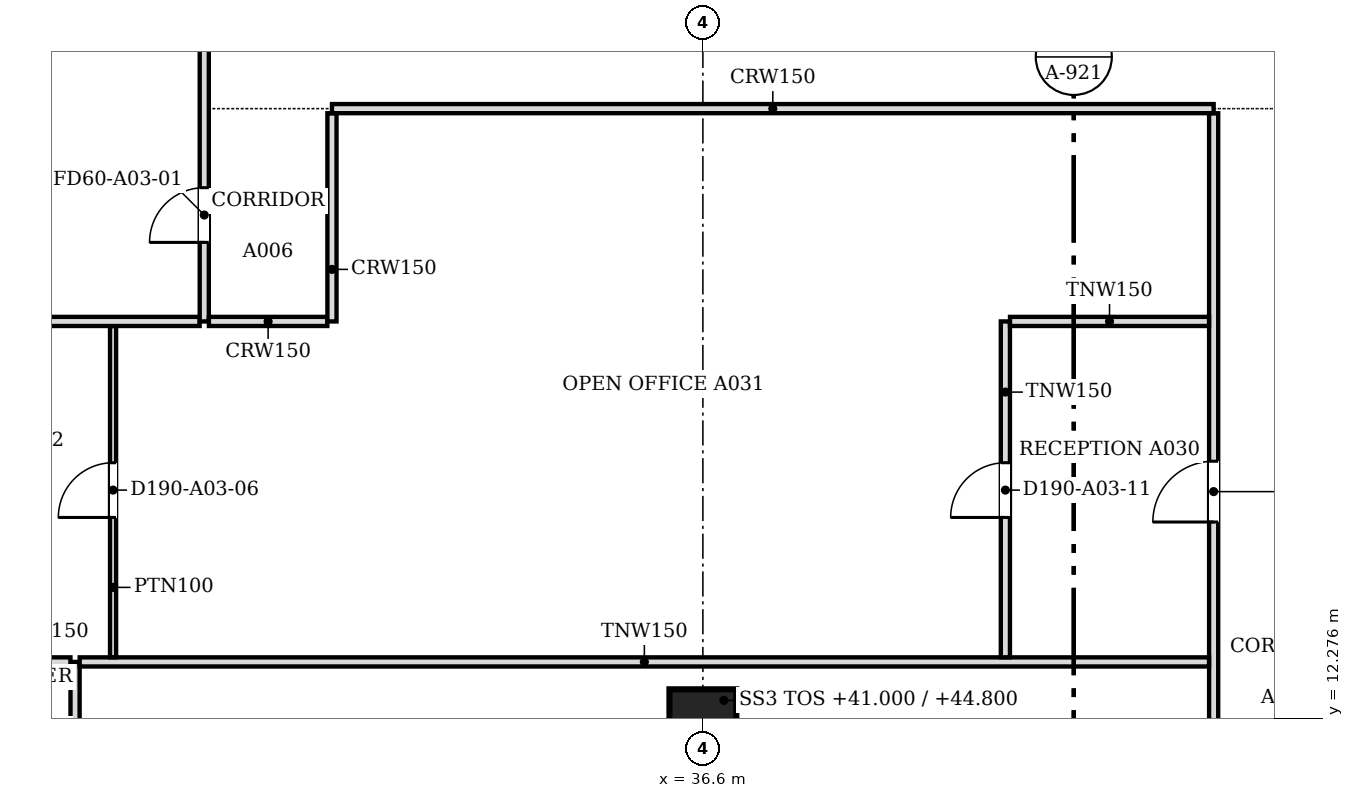
"""IFC4 building model, lengths in metres.
Left out: names, types, materials, properties, quantities, classifications, styles, units other than length and angle.
Written with IfcOpenShell. Run it as: python <this file> out.ifc"""

import sys

from ifc_helpers import new_model, si_unit, direction, frame, frame_2d, origin, origin_2d, place, context, subcontext, project, spatial, rectangle, extrude, source, transform, mapped, element, fill, save


model = new_model("IFC4")
c1 = context("Model", 3, precision=1e-05, world=origin(), true_north=direction((0.0, 1.0)))
c2 = subcontext(c1, "Body", "Model", "MODEL_VIEW")
j1 = project(units=[si_unit("LENGTHUNIT", "METRE"), si_unit("PLANEANGLEUNIT", "RADIAN")], contexts=[c1])
p1 = place(None, origin())
s1 = spatial("IfcSite", under=j1, at=p1, CompositionType="ELEMENT")
p2 = place(p1, origin())
s2 = spatial("IfcBuilding", under=s1, at=p2, CompositionType="ELEMENT")
p3 = place(p2, frame((0.0, 0.0, 41.0)))
s3 = spatial("IfcBuildingStorey", under=s2, at=p3, CompositionType="ELEMENT", Elevation=41.0)
p4 = place(p3, frame((36.6, 12.2, 0.0), z_axis=(0.0, 0.0, 1.0), x_axis=(1.0, 0.0, 0.0)))
e1 = element("IfcColumn", 1, at=p4, inside=s3, PredefinedType="COLUMN", context=c2, shape_type="SweptSolid", body=[
    extrude(rectangle(XDim=1.1, YDim=1.1, at=origin_2d()), origin(), (0.0, 0.0, 1.0), 3.6),
])
p5 = place(p3, frame((45.0, 0.5, 0.0), z_axis=(0.0, 0.0, 1.0), x_axis=(0.0, 1.0, 0.0)))
e2 = element("IfcWall", 2, at=p5, inside=s3, PredefinedType="PARTITIONING", context=c2, shape_type="SweptSolid", body=[
    extrude(rectangle(XDim=21.724, YDim=0.15, at=frame_2d((10.862, 0.0))), origin(), (0.0, 0.0, 1.0), 3.067),
])
m1 = source(origin(), c2, "Body", "SweptSolid", [
    extrude(rectangle(XDim=1.0, YDim=2.1, at=frame_2d((0.5, 1.05))), frame((0.0, 0.085, 0.0), z_axis=(0.0, -1.0, 0.0), x_axis=(1.0, 0.0, 0.0)), (0.0, 0.0, 1.0), 0.17),
])
p6 = place(p5, frame((15.001, 0.0, 0.0)))
e3 = element("IfcOpeningElement", 3, at=p6, cuts=e2, PredefinedType="OPENING", context=c2, shape_type="MappedRepresentation", body=[
    mapped(m1, transform((0.0, 0.0, 0.0), scale=1.0)),
])
p7 = place(p5, frame((7.7, 0.0, 0.0)))
e4 = element("IfcOpeningElement", 4, at=p7, cuts=e2, PredefinedType="OPENING", context=c2, shape_type="MappedRepresentation", body=[
    mapped(m1, transform((0.0, 0.0, 0.0), scale=1.0)),
])
p8 = place(p3, frame((26.275, 8.548, 0.0), z_axis=(0.0, 0.0, 1.0), x_axis=(0.0, 1.0, 0.0)))
e5 = element("IfcWall", 5, at=p8, inside=s3, PredefinedType="PARTITIONING", context=c2, shape_type="SweptSolid", body=[
    extrude(rectangle(XDim=4.652, YDim=0.15, at=frame_2d((2.326, 0.0))), origin(), (0.0, 0.0, 1.0), 3.067),
])
m2 = source(origin(), c2, "Body", "SweptSolid", [
    extrude(rectangle(XDim=0.9, YDim=2.1, at=frame_2d((0.45, 1.05))), frame((0.0, 0.085, 0.0), z_axis=(0.0, -1.0, 0.0), x_axis=(1.0, 0.0, 0.0)), (0.0, 0.0, 1.0), 0.17),
])
p9 = place(p8, frame((1.9, 0.0, 0.0)))
e6 = element("IfcOpeningElement", 6, at=p9, cuts=e5, PredefinedType="OPENING", context=c2, shape_type="MappedRepresentation", body=[
    mapped(m2, transform((0.0, 0.0, 0.0), scale=1.0)),
])
p10 = place(p3, frame((24.55, 13.2, 0.0), z_axis=(0.0, 0.0, 1.0), x_axis=(1.0, 0.0, 0.0)))
e7 = element("IfcWall", 7, at=p10, inside=s3, PredefinedType="PARTITIONING", context=c2, shape_type="SweptSolid", body=[
    extrude(rectangle(XDim=1.649, YDim=0.15, at=frame_2d((0.824, 0.0))), origin(), (0.0, 0.0, 1.0), 3.067),
])
p11 = place(p3, frame((26.351, 13.2, 0.0), z_axis=(0.0, 0.0, 1.0), x_axis=(1.0, 0.0, 0.0)))
e8 = element("IfcWall", 8, at=p11, inside=s3, PredefinedType="PARTITIONING", context=c2, shape_type="SweptSolid", body=[
    extrude(rectangle(XDim=18.573, YDim=0.15, at=frame_2d((9.287, 0.0))), origin(), (0.0, 0.0, 1.0), 3.067),
])
p12 = place(p3, frame((26.9, 13.276, 0.0), z_axis=(0.0, 0.0, 1.0), x_axis=(0.0, 1.0, 0.0)))
e9 = element("IfcWall", 9, at=p12, inside=s3, PredefinedType="PARTITIONING", context=c2, shape_type="SweptSolid", body=[
    extrude(rectangle(XDim=5.448, YDim=0.1, at=frame_2d((2.724, 0.0))), origin(), (0.0, 0.0, 1.0), 3.067),
])
m3 = source(origin(), c2, "Body", "SweptSolid", [
    extrude(rectangle(XDim=0.9, YDim=2.1, at=frame_2d((0.45, 1.05))), frame((0.0, 0.06, 0.0), z_axis=(0.0, -1.0, 0.0), x_axis=(1.0, 0.0, 0.0)), (0.0, 0.0, 1.0), 0.12),
])
p13 = place(p12, frame((2.3, 0.0, 0.0)))
e10 = element("IfcOpeningElement", 10, at=p13, cuts=e9, PredefinedType="OPENING", context=c2, shape_type="MappedRepresentation", body=[
    mapped(m3, transform((0.0, 0.0, 0.0), scale=1.0)),
])
p14 = place(p3, frame((41.575, 13.276, 0.0), z_axis=(0.0, 0.0, 1.0), x_axis=(0.0, 1.0, 0.0)))
e11 = element("IfcWall", 11, at=p14, inside=s3, PredefinedType="PARTITIONING", context=c2, shape_type="SweptSolid", body=[
    extrude(rectangle(XDim=5.524, YDim=0.15, at=frame_2d((2.762, 0.0))), origin(), (0.0, 0.0, 1.0), 3.067),
])
p15 = place(p14, frame((2.3, 0.0, 0.0)))
e12 = element("IfcOpeningElement", 12, at=p15, cuts=e11, PredefinedType="OPENING", context=c2, shape_type="MappedRepresentation", body=[
    mapped(m2, transform((0.0, 0.0, 0.0), scale=1.0)),
])
p16 = place(p3, frame((22.0, 18.8, 0.0), z_axis=(0.0, 0.0, 1.0), x_axis=(1.0, 0.0, 0.0)))
e13 = element("IfcWall", 13, at=p16, inside=s3, PredefinedType="PARTITIONING", context=c2, shape_type="SweptSolid", body=[
    extrude(rectangle(XDim=6.324, YDim=0.15, at=frame_2d((3.162, 0.0))), origin(), (0.0, 0.0, 1.0), 3.067),
])
p17 = place(p3, frame((28.4, 18.8, 0.0), z_axis=(0.0, 0.0, 1.0), x_axis=(0.0, 1.0, 0.0)))
e14 = element("IfcWall", 14, at=p17, inside=s3, PredefinedType="PARTITIONING", context=c2, shape_type="SweptSolid", body=[
    extrude(rectangle(XDim=26.824, YDim=0.15, at=frame_2d((13.412, 0.0))), origin(), (0.0, 0.0, 1.0), 3.067),
])
p18 = place(p17, frame((1.3, 0.0, 0.0)))
e15 = element("IfcOpeningElement", 15, at=p18, cuts=e14, PredefinedType="OPENING", context=c2, shape_type="MappedRepresentation", body=[
    mapped(m2, transform((0.0, 0.0, 0.0), scale=1.0)),
])
p19 = place(p17, frame((14.301, 0.0, 0.0)))
e16 = element("IfcOpeningElement", 16, at=p19, cuts=e14, PredefinedType="OPENING", context=c2, shape_type="MappedRepresentation", body=[
    mapped(m2, transform((0.0, 0.0, 0.0), scale=1.0)),
])
p20 = place(p17, frame((8.2, 0.0, 0.0)))
e17 = element("IfcOpeningElement", 17, at=p20, cuts=e14, PredefinedType="OPENING", context=c2, shape_type="MappedRepresentation", body=[
    mapped(m2, transform((0.0, 0.0, 0.0), scale=1.0)),
])
p21 = place(p17, frame((21.9, 0.0, 0.0)))
e18 = element("IfcOpeningElement", 18, at=p21, cuts=e14, PredefinedType="OPENING", context=c2, shape_type="MappedRepresentation", body=[
    mapped(m2, transform((0.0, 0.0, 0.0), scale=1.0)),
])
p22 = place(p3, frame((28.476, 18.8, 0.0), z_axis=(0.0, 0.0, 1.0), x_axis=(1.0, 0.0, 0.0)))
e19 = element("IfcWall", 19, at=p22, inside=s3, PredefinedType="PARTITIONING", context=c2, shape_type="SweptSolid", body=[
    extrude(rectangle(XDim=1.948, YDim=0.15, at=frame_2d((0.974, 0.0))), origin(), (0.0, 0.0, 1.0), 3.067),
])
p23 = place(p3, frame((30.5, 18.8, 0.0), z_axis=(0.0, 0.0, 1.0), x_axis=(0.0, 1.0, 0.0)))
e20 = element("IfcWall", 20, at=p23, inside=s3, PredefinedType="PARTITIONING", context=c2, shape_type="SweptSolid", body=[
    extrude(rectangle(XDim=3.424, YDim=0.15, at=frame_2d((1.712, 0.0))), origin(), (0.0, 0.0, 1.0), 3.067),
])
p24 = place(p3, frame((41.651, 18.8, 0.0), z_axis=(0.0, 0.0, 1.0), x_axis=(1.0, 0.0, 0.0)))
e21 = element("IfcWall", 21, at=p24, inside=s3, PredefinedType="PARTITIONING", context=c2, shape_type="SweptSolid", body=[
    extrude(rectangle(XDim=3.273, YDim=0.15, at=frame_2d((1.637, 0.0))), origin(), (0.0, 0.0, 1.0), 3.067),
])
p25 = place(p3, frame((30.5, 22.3, 0.0), z_axis=(0.0, 0.0, 1.0), x_axis=(1.0, 0.0, 0.0)))
e22 = element("IfcWall", 22, at=p25, inside=s3, PredefinedType="PARTITIONING", context=c2, shape_type="SweptSolid", body=[
    extrude(rectangle(XDim=14.5, YDim=0.15, at=frame_2d((7.25, 0.0))), origin(), (0.0, 0.0, 1.0), 3.067),
])
m4 = source(origin(), c2, "Body", "SweptSolid", [
    extrude(rectangle(XDim=0.9, YDim=2.1, at=frame_2d((0.45, 1.05))), frame((0.0, 0.025, 0.0), z_axis=(0.0, -1.0, 0.0), x_axis=(1.0, 0.0, 0.0)), (0.0, 0.0, 1.0), 0.05),
])
p26 = place(p18, origin())
e23 = element("IfcDoor", 23, at=p26, inside=s3, OperationType="SINGLE_SWING_LEFT", PredefinedType="DOOR", context=c2, shape_type="MappedRepresentation", body=[
    mapped(m4, transform((0.0, 0.0, 0.0), scale=1.0)),
])
fill(e15, e23)
p27 = place(p13, origin())
e24 = element("IfcDoor", 24, at=p27, inside=s3, OperationType="SINGLE_SWING_LEFT", PredefinedType="DOOR", context=c2, shape_type="MappedRepresentation", body=[
    mapped(m4, transform((0.0, 0.0, 0.0), scale=1.0)),
])
fill(e10, e24)
m5 = source(origin(), c2, "Body", "SweptSolid", [
    extrude(rectangle(XDim=1.0, YDim=2.1, at=frame_2d((0.5, 1.05))), frame((0.0, 0.025, 0.0), z_axis=(0.0, -1.0, 0.0), x_axis=(1.0, 0.0, 0.0)), (0.0, 0.0, 1.0), 0.05),
])
p28 = place(p6, origin())
e25 = element("IfcDoor", 25, at=p28, inside=s3, OperationType="SINGLE_SWING_LEFT", PredefinedType="DOOR", context=c2, shape_type="MappedRepresentation", body=[
    mapped(m5, transform((0.0, 0.0, 0.0), scale=1.0)),
])
fill(e3, e25)
p29 = place(p15, origin())
e26 = element("IfcDoor", 26, at=p29, inside=s3, OperationType="SINGLE_SWING_LEFT", PredefinedType="DOOR", context=c2, shape_type="MappedRepresentation", body=[
    mapped(m4, transform((0.0, 0.0, 0.0), scale=1.0)),
])
fill(e12, e26)
save(model, sys.argv[1])
